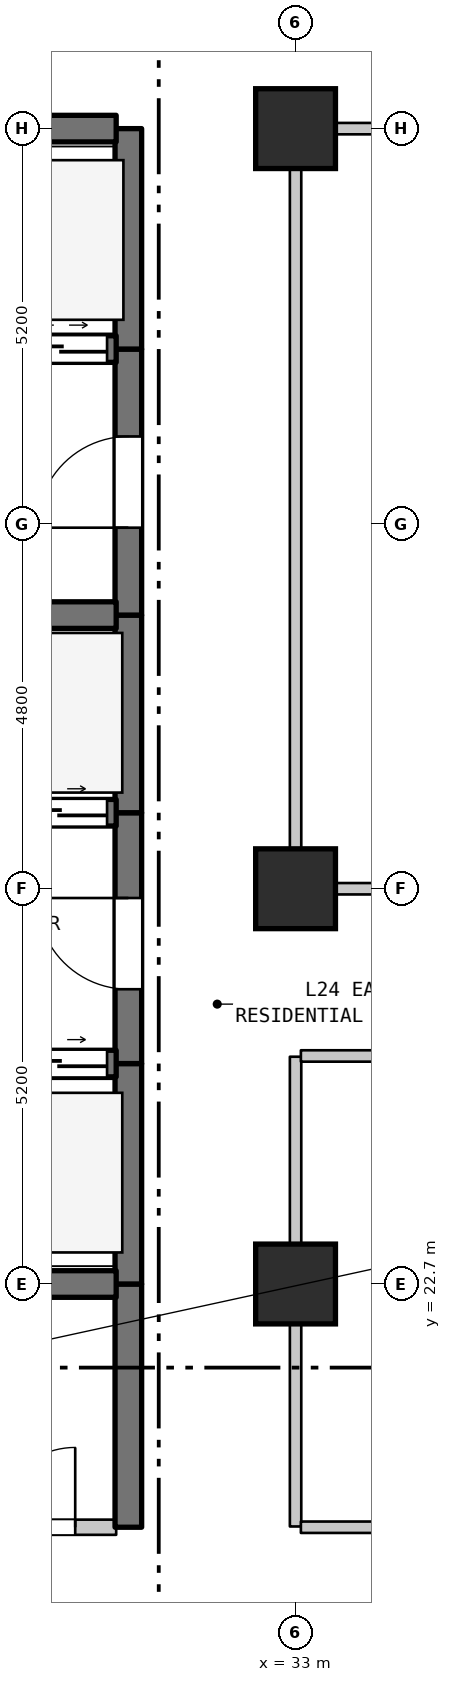
"""IFC4 building model, lengths in metres.
Left out: names, types, materials, properties, quantities, classifications, styles, units other than length and angle.
Written with IfcOpenShell. Run it as: python <this file> out.ifc"""

import sys

from ifc_helpers import new_model, si_unit, direction, frame, frame_2d, origin, origin_2d, place, context, subcontext, project, spatial, rectangle, extrude, element, fill, save


model = new_model("IFC4")
c1 = context("Model", 3, precision=1e-05, world=origin(), true_north=direction((0.0, 1.0)))
c2 = subcontext(c1, "Body", "Model", "MODEL_VIEW")
j1 = project(units=[si_unit("LENGTHUNIT", "METRE"), si_unit("PLANEANGLEUNIT", "RADIAN")], contexts=[c1])
p1 = place(None, origin())
s1 = spatial("IfcSite", under=j1, at=p1, CompositionType="ELEMENT")
p2 = place(p1, origin())
s2 = spatial("IfcBuilding", under=s1, at=p2, CompositionType="ELEMENT")
p3 = place(p2, frame((0.0, 0.0, 102.0)))
s3 = spatial("IfcBuildingStorey", under=s2, at=p3, CompositionType="ELEMENT", Elevation=102.0)
for number, where, z_axis, x_axis in (
    (1, (33.0, 22.7, 0.0), (0.0, 0.0, 1.0), (1.0, 0.0, 0.0)),
    (2, (33.0, 27.9, 0.0), (0.0, 0.0, 1.0), (1.0, 0.0, 0.0)),
    (3, (33.0, 37.9, 0.0), (0.0, 0.0, 1.0), (1.0, 0.0, 0.0)),
):
    element("IfcColumn", number, at=place(p3, frame(where, z_axis=z_axis, x_axis=x_axis)), inside=s3, PredefinedType="COLUMN", context=c2, shape_type="SweptSolid", body=[
        extrude(rectangle(XDim=1.05, YDim=1.05, at=origin_2d()), origin(), (0.0, 0.0, 1.0), 3.7),
    ])
p4 = place(p3, frame((30.8, 19.5, 0.0), z_axis=(0.0, 0.0, 1.0), x_axis=(0.0, 1.0, 0.0)))
e4 = element("IfcWall", 4, at=p4, inside=s3, PredefinedType="SHEAR", context=c2, shape_type="SweptSolid", body=[
    extrude(rectangle(XDim=3.2, YDim=0.35, at=frame_2d((1.6, 0.0))), origin(), (0.0, 0.0, 1.0), 3.385),
])
p5 = place(p3, frame((30.8, 22.7, 0.0), z_axis=(0.0, 0.0, 1.0), x_axis=(0.0, 1.0, 0.0)))
e5 = element("IfcWall", 5, at=p5, inside=s3, PredefinedType="SHEAR", context=c2, shape_type="SweptSolid", body=[
    extrude(rectangle(XDim=2.9, YDim=0.35, at=frame_2d((1.45, 0.0))), origin(), (0.0, 0.0, 1.0), 3.385),
])
p6 = place(p3, frame((30.8, 25.6, 0.0), z_axis=(0.0, 0.0, 1.0), x_axis=(0.0, 1.0, 0.0)))
e6 = element("IfcWall", 6, at=p6, inside=s3, PredefinedType="SHEAR", context=c2, shape_type="SweptSolid", body=[
    extrude(rectangle(XDim=3.3, YDim=0.35, at=frame_2d((1.65, 0.0))), origin(), (0.0, 0.0, 1.0), 3.385),
])
p7 = place(p6, frame((0.978, 0.0, 0.0)))
e7 = element("IfcOpeningElement", 7, at=p7, cuts=e6, PredefinedType="OPENING", context=c2, shape_type="SweptSolid", body=[
    extrude(rectangle(XDim=1.2, YDim=2.2, at=frame_2d((0.6, 1.1))), frame((0.0, 0.185, 0.0), z_axis=(0.0, -1.0, 0.0), x_axis=(1.0, 0.0, 0.0)), (0.0, 0.0, 1.0), 0.37),
])
p8 = place(p3, frame((30.8, 28.9, 0.0), z_axis=(0.0, 0.0, 1.0), x_axis=(0.0, 1.0, 0.0)))
e8 = element("IfcWall", 8, at=p8, inside=s3, PredefinedType="SHEAR", context=c2, shape_type="SweptSolid", body=[
    extrude(rectangle(XDim=2.6, YDim=0.35, at=frame_2d((1.3, 0.0))), origin(), (0.0, 0.0, 1.0), 3.385),
])
p9 = place(p3, frame((30.8, 31.5, 0.0), z_axis=(0.0, 0.0, 1.0), x_axis=(0.0, 1.0, 0.0)))
e9 = element("IfcWall", 9, at=p9, inside=s3, PredefinedType="SHEAR", context=c2, shape_type="SweptSolid", body=[
    extrude(rectangle(XDim=3.5, YDim=0.35, at=frame_2d((1.75, 0.0))), origin(), (0.0, 0.0, 1.0), 3.385),
])
p10 = place(p9, frame((1.15, 0.0, 0.0)))
e10 = element("IfcOpeningElement", 10, at=p10, cuts=e9, PredefinedType="OPENING", context=c2, shape_type="SweptSolid", body=[
    extrude(rectangle(XDim=1.2, YDim=2.2, at=frame_2d((0.6, 1.1))), frame((0.0, 0.185, 0.0), z_axis=(0.0, -1.0, 0.0), x_axis=(1.0, 0.0, 0.0)), (0.0, 0.0, 1.0), 0.37),
])
p11 = place(p3, frame((30.8, 35.0, 0.0), z_axis=(0.0, 0.0, 1.0), x_axis=(0.0, 1.0, 0.0)))
e11 = element("IfcWall", 11, at=p11, inside=s3, PredefinedType="SHEAR", context=c2, shape_type="SweptSolid", body=[
    extrude(rectangle(XDim=2.9, YDim=0.35, at=frame_2d((1.45, 0.0))), origin(), (0.0, 0.0, 1.0), 3.385),
])
p12 = place(p3, frame((33.0, 19.51, 0.0), z_axis=(0.0, 0.0, 1.0), x_axis=(0.0, 1.0, 0.0)))
e12 = element("IfcWall", 12, at=p12, inside=s3, PredefinedType="STANDARD", context=c2, shape_type="SweptSolid", body=[
    extrude(rectangle(XDim=6.18, YDim=0.15, at=frame_2d((3.09, 0.0))), origin(), (0.0, 0.0, 1.0), 2.935),
])
p13 = place(p3, frame((33.0, 27.91, 0.0), z_axis=(0.0, 0.0, 1.0), x_axis=(0.0, 1.0, 0.0)))
e13 = element("IfcWall", 13, at=p13, inside=s3, PredefinedType="STANDARD", context=c2, shape_type="SweptSolid", body=[
    extrude(rectangle(XDim=9.98, YDim=0.15, at=frame_2d((4.99, 0.0))), origin(), (0.0, 0.0, 1.0), 2.885),
])
p14 = place(p3, frame((28.585, 19.5, 0.0), z_axis=(0.0, 0.0, 1.0), x_axis=(1.0, 0.0, 0.0)))
e14 = element("IfcWall", 14, at=p14, inside=s3, PredefinedType="STANDARD", context=c2, shape_type="SweptSolid", body=[
    extrude(rectangle(XDim=2.055, YDim=0.2, at=frame_2d((1.027, 0.0))), origin(), (0.0, 0.0, 1.0), 3.385),
])
p15 = place(p14, frame((0.466, 0.0, 0.0)))
e15 = element("IfcOpeningElement", 15, at=p15, cuts=e14, PredefinedType="OPENING", context=c2, shape_type="SweptSolid", body=[
    extrude(rectangle(XDim=1.05, YDim=2.15, at=frame_2d((0.525, 1.075))), frame((0.0, 0.11, 0.0), z_axis=(0.0, -1.0, 0.0), x_axis=(1.0, 0.0, 0.0)), (0.0, 0.0, 1.0), 0.22),
])
p16 = place(p3, frame((33.07, 19.5, 0.0), z_axis=(0.0, 0.0, 1.0), x_axis=(1.0, 0.0, 0.0)))
e16 = element("IfcWall", 16, at=p16, inside=s3, PredefinedType="STANDARD", context=c2, shape_type="SweptSolid", body=[
    extrude(rectangle(XDim=21.51, YDim=0.15, at=frame_2d((10.755, 0.0))), origin(), (0.0, 0.0, 1.0), 3.385),
])
p17 = place(p3, frame((28.585, 22.7, 0.0), z_axis=(0.0, 0.0, 1.0), x_axis=(1.0, 0.0, 0.0)))
e17 = element("IfcWall", 17, at=p17, inside=s3, PredefinedType="SHEAR", context=c2, shape_type="SweptSolid", body=[
    extrude(rectangle(XDim=2.055, YDim=0.35, at=frame_2d((1.027, 0.0))), origin(), (0.0, 0.0, 1.0), 3.385),
])
p18 = place(p3, frame((27.46, 25.6, 0.0), z_axis=(0.0, 0.0, 1.0), x_axis=(1.0, 0.0, 0.0)))
e18 = element("IfcWall", 18, at=p18, inside=s3, PredefinedType="SHEAR", context=c2, shape_type="SweptSolid", body=[
    extrude(rectangle(XDim=3.18, YDim=0.35, at=frame_2d((1.59, 0.0))), origin(), (0.0, 0.0, 1.0), 3.385),
])
p19 = place(p18, frame((0.12, 0.0, 0.0)))
e19 = element("IfcOpeningElement", 19, at=p19, cuts=e18, PredefinedType="OPENING", context=c2, shape_type="SweptSolid", body=[
    extrude(rectangle(XDim=1.25, YDim=2.2, at=frame_2d((0.625, 1.1))), frame((0.0, 0.185, 0.0), z_axis=(0.0, -1.0, 0.0), x_axis=(1.0, 0.0, 0.0)), (0.0, 0.0, 1.0), 0.37),
])
p20 = place(p18, frame((1.81, 0.0, 0.0)))
e20 = element("IfcOpeningElement", 20, at=p20, cuts=e18, PredefinedType="OPENING", context=c2, shape_type="SweptSolid", body=[
    extrude(rectangle(XDim=1.25, YDim=2.2, at=frame_2d((0.625, 1.1))), frame((0.0, 0.185, 0.0), z_axis=(0.0, -1.0, 0.0), x_axis=(1.0, 0.0, 0.0)), (0.0, 0.0, 1.0), 0.37),
])
p21 = place(p3, frame((33.07, 25.7, 0.0), z_axis=(0.0, 0.0, 1.0), x_axis=(1.0, 0.0, 0.0)))
e21 = element("IfcWall", 21, at=p21, inside=s3, PredefinedType="STANDARD", context=c2, shape_type="SweptSolid", body=[
    extrude(rectangle(XDim=21.51, YDim=0.15, at=frame_2d((10.755, 0.0))), origin(), (0.0, 0.0, 1.0), 3.385),
])
p22 = place(p3, frame((33.07, 27.9, 0.0), z_axis=(0.0, 0.0, 1.0), x_axis=(1.0, 0.0, 0.0)))
e22 = element("IfcWall", 22, at=p22, inside=s3, PredefinedType="STANDARD", context=c2, shape_type="SweptSolid", body=[
    extrude(rectangle(XDim=11.93, YDim=0.15, at=frame_2d((5.965, 0.0))), origin(), (0.0, 0.0, 1.0), 2.885),
])
p23 = place(p22, frame((10.185, 0.0, 0.0)))
e23 = element("IfcOpeningElement", 23, at=p23, cuts=e22, PredefinedType="OPENING", context=c2, shape_type="SweptSolid", body=[
    extrude(rectangle(XDim=1.0, YDim=2.15, at=frame_2d((0.5, 1.075))), frame((0.0, 0.085, 0.0), z_axis=(0.0, -1.0, 0.0), x_axis=(1.0, 0.0, 0.0)), (0.0, 0.0, 1.0), 0.17),
])
p24 = place(p3, frame((27.46, 28.9, 0.0), z_axis=(0.0, 0.0, 1.0), x_axis=(1.0, 0.0, 0.0)))
e24 = element("IfcWall", 24, at=p24, inside=s3, PredefinedType="SHEAR", context=c2, shape_type="SweptSolid", body=[
    extrude(rectangle(XDim=3.18, YDim=0.35, at=frame_2d((1.59, 0.0))), origin(), (0.0, 0.0, 1.0), 3.385),
])
p25 = place(p24, frame((0.12, 0.0, 0.0)))
e25 = element("IfcOpeningElement", 25, at=p25, cuts=e24, PredefinedType="OPENING", context=c2, shape_type="SweptSolid", body=[
    extrude(rectangle(XDim=1.25, YDim=2.2, at=frame_2d((0.625, 1.1))), frame((0.0, 0.185, 0.0), z_axis=(0.0, -1.0, 0.0), x_axis=(1.0, 0.0, 0.0)), (0.0, 0.0, 1.0), 0.37),
])
p26 = place(p24, frame((1.81, 0.0, 0.0)))
e26 = element("IfcOpeningElement", 26, at=p26, cuts=e24, PredefinedType="OPENING", context=c2, shape_type="SweptSolid", body=[
    extrude(rectangle(XDim=1.25, YDim=2.2, at=frame_2d((0.625, 1.1))), frame((0.0, 0.185, 0.0), z_axis=(0.0, -1.0, 0.0), x_axis=(1.0, 0.0, 0.0)), (0.0, 0.0, 1.0), 0.37),
])
p27 = place(p3, frame((27.46, 31.5, 0.0), z_axis=(0.0, 0.0, 1.0), x_axis=(1.0, 0.0, 0.0)))
e27 = element("IfcWall", 27, at=p27, inside=s3, PredefinedType="SHEAR", context=c2, shape_type="SweptSolid", body=[
    extrude(rectangle(XDim=3.18, YDim=0.35, at=frame_2d((1.59, 0.0))), origin(), (0.0, 0.0, 1.0), 3.385),
])
p28 = place(p3, frame((19.16, 35.0, 0.0), z_axis=(0.0, 0.0, 1.0), x_axis=(1.0, 0.0, 0.0)))
e28 = element("IfcWall", 28, at=p28, inside=s3, PredefinedType="SHEAR", context=c2, shape_type="SweptSolid", body=[
    extrude(rectangle(XDim=11.48, YDim=0.35, at=frame_2d((5.74, 0.0))), origin(), (0.0, 0.0, 1.0), 3.385),
])
p29 = place(p28, frame((0.365, 0.0, 0.0)))
e29 = element("IfcOpeningElement", 29, at=p29, cuts=e28, PredefinedType="OPENING", context=c2, shape_type="SweptSolid", body=[
    extrude(rectangle(XDim=1.35, YDim=2.2, at=frame_2d((0.675, 1.1))), frame((0.0, 0.185, 0.0), z_axis=(0.0, -1.0, 0.0), x_axis=(1.0, 0.0, 0.0)), (0.0, 0.0, 1.0), 0.37),
])
p30 = place(p28, frame((2.765, 0.0, 0.0)))
e30 = element("IfcOpeningElement", 30, at=p30, cuts=e28, PredefinedType="OPENING", context=c2, shape_type="SweptSolid", body=[
    extrude(rectangle(XDim=1.35, YDim=2.2, at=frame_2d((0.675, 1.1))), frame((0.0, 0.185, 0.0), z_axis=(0.0, -1.0, 0.0), x_axis=(1.0, 0.0, 0.0)), (0.0, 0.0, 1.0), 0.37),
])
p31 = place(p28, frame((4.915, 0.0, 0.0)))
e31 = element("IfcOpeningElement", 31, at=p31, cuts=e28, PredefinedType="OPENING", context=c2, shape_type="SweptSolid", body=[
    extrude(rectangle(XDim=1.2, YDim=2.2, at=frame_2d((0.6, 1.1))), frame((0.0, 0.185, 0.0), z_axis=(0.0, -1.0, 0.0), x_axis=(1.0, 0.0, 0.0)), (0.0, 0.0, 1.0), 0.37),
])
p32 = place(p28, frame((6.665, 0.0, 0.0)))
e32 = element("IfcOpeningElement", 32, at=p32, cuts=e28, PredefinedType="OPENING", context=c2, shape_type="SweptSolid", body=[
    extrude(rectangle(XDim=1.2, YDim=2.2, at=frame_2d((0.6, 1.1))), frame((0.0, 0.185, 0.0), z_axis=(0.0, -1.0, 0.0), x_axis=(1.0, 0.0, 0.0)), (0.0, 0.0, 1.0), 0.37),
])
p33 = place(p28, frame((8.415, 0.0, 0.0)))
e33 = element("IfcOpeningElement", 33, at=p33, cuts=e28, PredefinedType="OPENING", context=c2, shape_type="SweptSolid", body=[
    extrude(rectangle(XDim=1.2, YDim=2.2, at=frame_2d((0.6, 1.1))), frame((0.0, 0.185, 0.0), z_axis=(0.0, -1.0, 0.0), x_axis=(1.0, 0.0, 0.0)), (0.0, 0.0, 1.0), 0.37),
])
p34 = place(p28, frame((10.16, 0.0, 0.0)))
e34 = element("IfcOpeningElement", 34, at=p34, cuts=e28, PredefinedType="OPENING", context=c2, shape_type="SweptSolid", body=[
    extrude(rectangle(XDim=1.2, YDim=2.2, at=frame_2d((0.6, 1.1))), frame((0.0, 0.185, 0.0), z_axis=(0.0, -1.0, 0.0), x_axis=(1.0, 0.0, 0.0)), (0.0, 0.0, 1.0), 0.37),
])
p35 = place(p3, frame((19.16, 37.9, 0.0), z_axis=(0.0, 0.0, 1.0), x_axis=(1.0, 0.0, 0.0)))
e35 = element("IfcWall", 35, at=p35, inside=s3, PredefinedType="SHEAR", context=c2, shape_type="SweptSolid", body=[
    extrude(rectangle(XDim=11.48, YDim=0.35, at=frame_2d((5.74, 0.0))), origin(), (0.0, 0.0, 1.0), 3.385),
])
p36 = place(p3, frame((33.07, 37.9, 0.0), z_axis=(0.0, 0.0, 1.0), x_axis=(1.0, 0.0, 0.0)))
e36 = element("IfcWall", 36, at=p36, inside=s3, PredefinedType="STANDARD", context=c2, shape_type="SweptSolid", body=[
    extrude(rectangle(XDim=26.935, YDim=0.15, at=frame_2d((13.467, 0.0))), origin(), (0.0, 0.0, 1.0), 3.385),
])
p37 = place(p36, frame((12.96, 0.0, 0.0)))
e37 = element("IfcOpeningElement", 37, at=p37, cuts=e36, PredefinedType="OPENING", context=c2, shape_type="SweptSolid", body=[
    extrude(rectangle(XDim=1.0, YDim=2.15, at=frame_2d((0.5, 1.075))), frame((0.0, 0.085, 0.0), z_axis=(0.0, -1.0, 0.0), x_axis=(1.0, 0.0, 0.0)), (0.0, 0.0, 1.0), 0.17),
])
p38 = place(p7, origin())
e38 = element("IfcDoor", 38, at=p38, inside=s3, OperationType="SINGLE_SWING_RIGHT", PredefinedType="DOOR", context=c2, shape_type="SweptSolid", body=[
    extrude(rectangle(XDim=1.2, YDim=2.2, at=frame_2d((0.6, 1.1))), frame((0.0, 0.025, 0.0), z_axis=(0.0, -1.0, 0.0), x_axis=(1.0, 0.0, 0.0)), (0.0, 0.0, 1.0), 0.05),
])
fill(e7, e38)
p39 = place(p10, origin())
e39 = element("IfcDoor", 39, at=p39, inside=s3, OperationType="SINGLE_SWING_LEFT", PredefinedType="DOOR", context=c2, shape_type="SweptSolid", body=[
    extrude(rectangle(XDim=1.2, YDim=2.2, at=frame_2d((0.6, 1.1))), frame((0.0, 0.025, 0.0), z_axis=(0.0, -1.0, 0.0), x_axis=(1.0, 0.0, 0.0)), (0.0, 0.0, 1.0), 0.05),
])
fill(e10, e39)
p40 = place(p15, origin())
e40 = element("IfcDoor", 40, at=p40, inside=s3, OperationType="SINGLE_SWING_RIGHT", PredefinedType="DOOR", context=c2, shape_type="SweptSolid", body=[
    extrude(rectangle(XDim=1.05, YDim=2.15, at=frame_2d((0.525, 1.075))), frame((0.0, 0.025, 0.0), z_axis=(0.0, -1.0, 0.0), x_axis=(1.0, 0.0, 0.0)), (0.0, 0.0, 1.0), 0.05),
])
fill(e15, e40)
p41 = place(p20, origin())
e41 = element("IfcDoor", 41, at=p41, inside=s3, OperationType="DOUBLE_DOOR_SLIDING", PredefinedType="DOOR", context=c2, shape_type="SweptSolid", body=[
    extrude(rectangle(XDim=1.25, YDim=2.2, at=frame_2d((0.625, 1.1))), frame((0.0, 0.025, 0.0), z_axis=(0.0, -1.0, 0.0), x_axis=(1.0, 0.0, 0.0)), (0.0, 0.0, 1.0), 0.05),
])
fill(e20, e41)
p42 = place(p26, origin())
e42 = element("IfcDoor", 42, at=p42, inside=s3, OperationType="DOUBLE_DOOR_SLIDING", PredefinedType="DOOR", context=c2, shape_type="SweptSolid", body=[
    extrude(rectangle(XDim=1.25, YDim=2.2, at=frame_2d((0.625, 1.1))), frame((0.0, 0.025, 0.0), z_axis=(0.0, -1.0, 0.0), x_axis=(1.0, 0.0, 0.0)), (0.0, 0.0, 1.0), 0.05),
])
fill(e26, e42)
p43 = place(p34, origin())
e43 = element("IfcDoor", 43, at=p43, inside=s3, OperationType="DOUBLE_DOOR_SLIDING", PredefinedType="DOOR", context=c2, shape_type="SweptSolid", body=[
    extrude(rectangle(XDim=1.2, YDim=2.2, at=frame_2d((0.6, 1.1))), frame((0.0, 0.025, 0.0), z_axis=(0.0, -1.0, 0.0), x_axis=(1.0, 0.0, 0.0)), (0.0, 0.0, 1.0), 0.05),
])
fill(e34, e43)
save(model, sys.argv[1])
